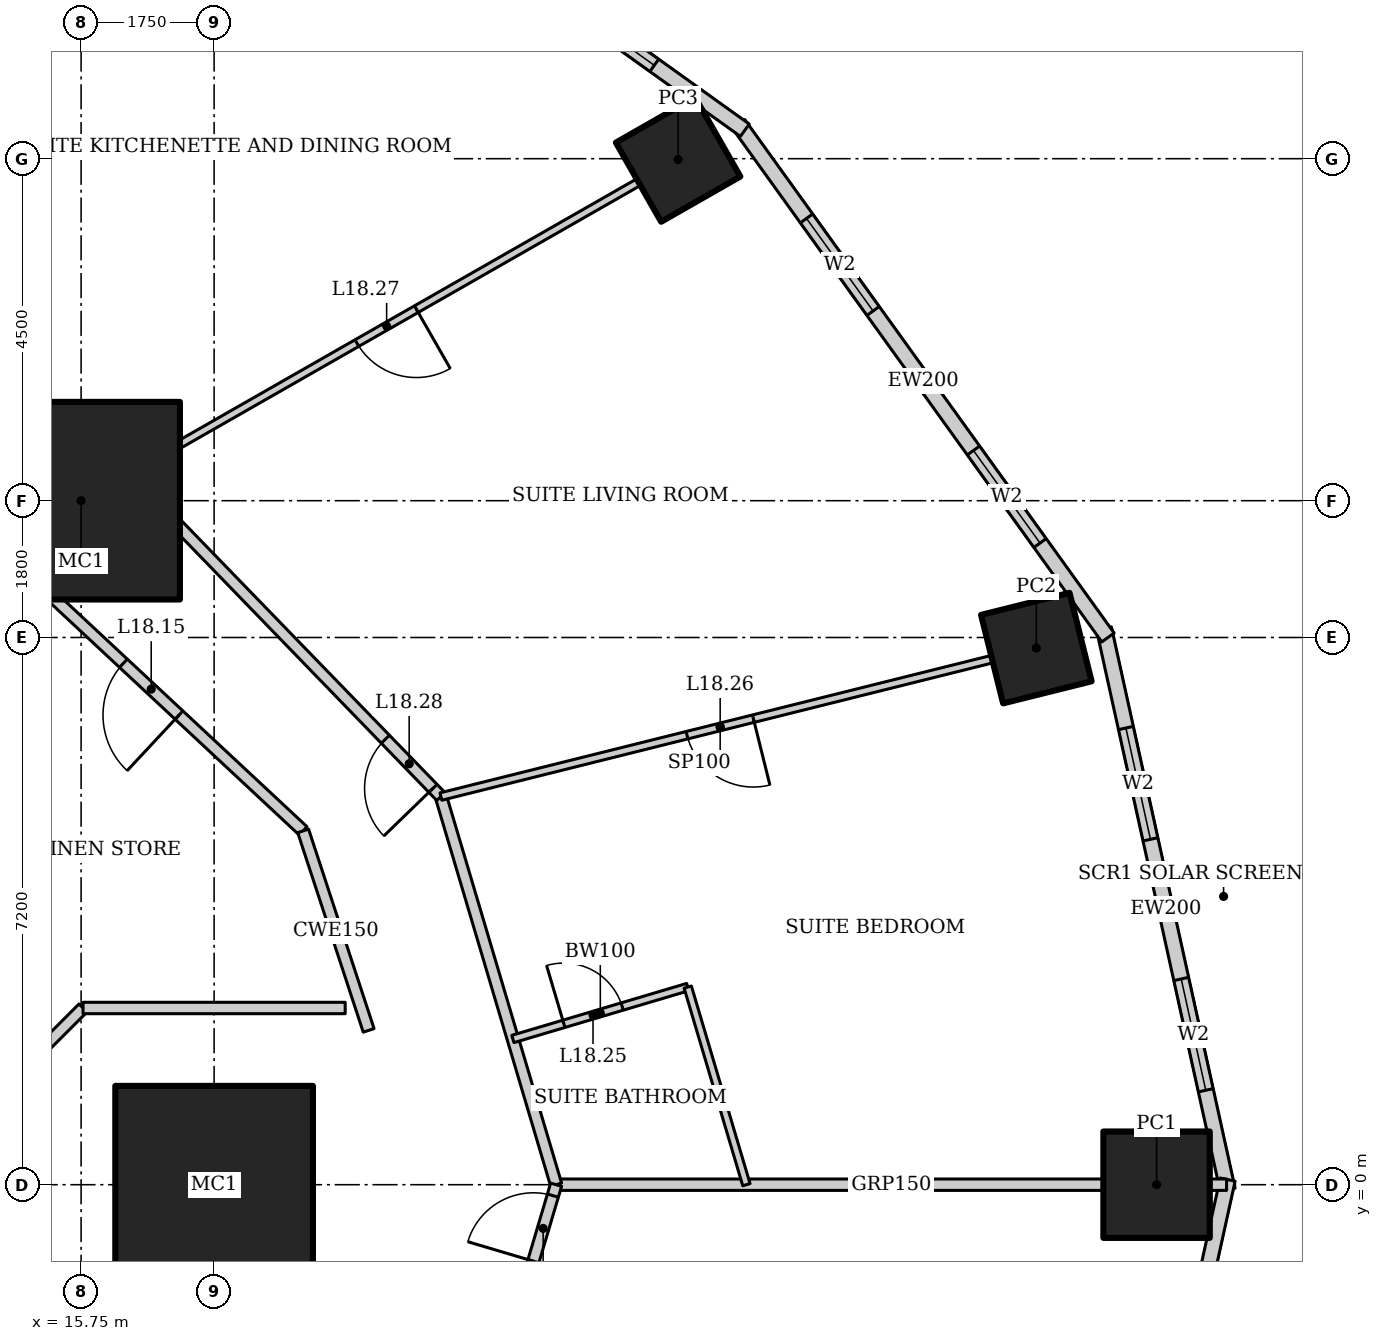
"""IFC4 building model, lengths in metres.
Left out: names, types, materials, properties, quantities, classifications, styles, units other than length and angle.
Written with IfcOpenShell. Run it as: python <this file> out.ifc"""

import sys

from ifc_helpers import new_model, si_unit, direction, frame, frame_2d, origin, origin_2d, place, context, subcontext, project, spatial, rectangle, hollow_rectangle, extrude, element, fill, save


model = new_model("IFC4")
c1 = context("Model", 3, precision=1e-05, world=origin(), true_north=direction((0.0, 1.0)))
c2 = subcontext(c1, "Body", "Model", "MODEL_VIEW")
j1 = project(units=[si_unit("LENGTHUNIT", "METRE"), si_unit("PLANEANGLEUNIT", "RADIAN")], contexts=[c1])
p1 = place(None, origin())
s1 = spatial("IfcSite", under=j1, at=p1, CompositionType="ELEMENT")
p2 = place(p1, origin())
s2 = spatial("IfcBuilding", under=s1, at=p2, CompositionType="ELEMENT")
p3 = place(p2, frame((0.0, 0.0, 80.2)))
s3 = spatial("IfcBuildingStorey", under=s2, at=p3, CompositionType="ELEMENT", Elevation=80.2)
for number, where, z_axis, x_axis in (
    (1, (17.5, 0.0, 0.0), (0.0, 0.0, 1.0), (1.0, 0.0, 0.0)),
    (2, (15.75, 9.0, 0.0), (0.0, 0.0, 1.0), (1.0, 0.0, 0.0)),
):
    element("IfcColumn", number, at=place(p3, frame(where, z_axis=z_axis, x_axis=x_axis)), inside=s3, PredefinedType="COLUMN", context=c2, shape_type="SweptSolid", body=[
        extrude(hollow_rectangle(XDim=2.6, YDim=2.6, WallThickness=0.13, at=origin_2d()), origin(), (0.0, 0.0, 1.0), 3.6),
    ])
p4 = place(p3, frame((29.9, 0.0, 0.0), z_axis=(0.0, 0.0, 1.0), x_axis=(1.0, 0.0, 0.0)))
e3 = element("IfcColumn", 3, at=p4, inside=s3, PredefinedType="COLUMN", context=c2, shape_type="SweptSolid", body=[
    extrude(hollow_rectangle(XDim=1.4, YDim=1.4, WallThickness=0.1, at=origin_2d()), origin(), (0.0, 0.0, 1.0), 3.6),
])
p5 = place(p3, frame((28.318, 7.06, 0.0), z_axis=(0.0, 0.0, 1.0), x_axis=(0.970295726276, 0.2419218956, 0.0)))
e4 = element("IfcColumn", 4, at=p5, inside=s3, PredefinedType="COLUMN", context=c2, shape_type="SweptSolid", body=[
    extrude(hollow_rectangle(XDim=1.2, YDim=1.2, WallThickness=0.1, at=origin_2d()), origin(), (0.0, 0.0, 1.0), 3.6),
])
p6 = place(p3, frame((23.605, 13.489, 0.0), z_axis=(0.0, 0.0, 1.0), x_axis=(0.86824298017, 0.496139221777, 0.0)))
e5 = element("IfcColumn", 5, at=p6, inside=s3, PredefinedType="COLUMN", context=c2, shape_type="SweptSolid", body=[
    extrude(hollow_rectangle(XDim=1.2, YDim=1.2, WallThickness=0.12, at=origin_2d()), origin(), (0.0, 0.0, 1.0), 3.6),
])
p7 = place(p3, frame((30.835, -0.067, 0.0), z_axis=(0.0, 0.0, 1.0), x_axis=(-0.215238065514, 0.976561608478, 0.0)))
e6 = element("IfcWall", 6, at=p7, inside=s3, PredefinedType="SOLIDWALL", context=c2, shape_type="SweptSolid", body=[
    extrude(rectangle(XDim=7.562, YDim=0.2, at=frame_2d((3.781, 0.0))), origin(), (0.0, 0.0, 1.0), 3.45),
])
p8 = place(p7, frame((1.341, 0.0, 0.5)))
e7 = element("IfcOpeningElement", 7, at=p8, cuts=e6, PredefinedType="OPENING", context=c2, shape_type="SweptSolid", body=[
    extrude(rectangle(XDim=1.5, YDim=2.2, at=frame_2d((0.75, 1.1))), frame((0.0, 0.11, 0.0), z_axis=(0.0, -1.0, 0.0), x_axis=(1.0, 0.0, 0.0)), (0.0, 0.0, 1.0), 0.22),
])
p9 = place(p7, frame((4.722, 0.0, 0.5)))
e8 = element("IfcOpeningElement", 8, at=p9, cuts=e6, PredefinedType="OPENING", context=c2, shape_type="SweptSolid", body=[
    extrude(rectangle(XDim=1.5, YDim=2.2, at=frame_2d((0.75, 1.1))), frame((0.0, 0.11, 0.0), z_axis=(0.0, -1.0, 0.0), x_axis=(1.0, 0.0, 0.0)), (0.0, 0.0, 1.0), 0.22),
])
p10 = place(p3, frame((29.26, 7.2, 0.0), z_axis=(0.0, 0.0, 1.0), x_axis=(-0.583937613703, 0.811798536155, 0.0)))
e9 = element("IfcWall", 9, at=p10, inside=s3, PredefinedType="SOLIDWALL", context=c2, shape_type="SweptSolid", body=[
    extrude(rectangle(XDim=8.323, YDim=0.2, at=frame_2d((4.162, 0.0))), origin(), (0.0, 0.0, 1.0), 3.45),
])
p11 = place(p10, frame((1.531, 0.0, 0.5)))
e10 = element("IfcOpeningElement", 10, at=p11, cuts=e9, PredefinedType="OPENING", context=c2, shape_type="SweptSolid", body=[
    extrude(rectangle(XDim=1.5, YDim=2.2, at=frame_2d((0.75, 1.1))), frame((0.0, 0.11, 0.0), z_axis=(0.0, -1.0, 0.0), x_axis=(1.0, 0.0, 0.0)), (0.0, 0.0, 1.0), 0.22),
])
p12 = place(p10, frame((5.292, 0.0, 0.5)))
e11 = element("IfcOpeningElement", 11, at=p12, cuts=e9, PredefinedType="OPENING", context=c2, shape_type="SweptSolid", body=[
    extrude(rectangle(XDim=1.5, YDim=2.2, at=frame_2d((0.75, 1.1))), frame((0.0, 0.11, 0.0), z_axis=(0.0, -1.0, 0.0), x_axis=(1.0, 0.0, 0.0)), (0.0, 0.0, 1.0), 0.22),
])
p13 = place(p3, frame((24.482, 13.875, 0.0), z_axis=(0.0, 0.0, 1.0), x_axis=(-0.812791321576, 0.582554948112, 0.0)))
e12 = element("IfcWall", 12, at=p13, inside=s3, PredefinedType="SOLIDWALL", context=c2, shape_type="SweptSolid", body=[
    extrude(rectangle(XDim=8.063, YDim=0.2, at=frame_2d((4.032, 0.0))), origin(), (0.0, 0.0, 1.0), 3.45),
])
p14 = place(p13, frame((1.466, 0.0, 0.5)))
e13 = element("IfcOpeningElement", 13, at=p14, cuts=e12, PredefinedType="OPENING", context=c2, shape_type="SweptSolid", body=[
    extrude(rectangle(XDim=1.5, YDim=2.2, at=frame_2d((0.75, 1.1))), frame((0.0, 0.11, 0.0), z_axis=(0.0, -1.0, 0.0), x_axis=(1.0, 0.0, 0.0)), (0.0, 0.0, 1.0), 0.22),
])
p15 = place(p13, frame((5.097, 0.0, 0.5)))
e14 = element("IfcOpeningElement", 14, at=p15, cuts=e12, PredefinedType="OPENING", context=c2, shape_type="SweptSolid", body=[
    extrude(rectangle(XDim=1.5, YDim=2.2, at=frame_2d((0.75, 1.1))), frame((0.0, 0.11, 0.0), z_axis=(0.0, -1.0, 0.0), x_axis=(1.0, 0.0, 0.0)), (0.0, 0.0, 1.0), 0.22),
])
p16 = place(p3, frame((29.208, -7.318, 0.0), z_axis=(0.0, 0.0, 1.0), x_axis=(0.215238065514, 0.976561608478, 0.0)))
e15 = element("IfcWall", 15, at=p16, inside=s3, PredefinedType="SOLIDWALL", context=c2, shape_type="SweptSolid", body=[
    extrude(rectangle(XDim=7.562, YDim=0.2, at=frame_2d((3.781, 0.0))), origin(), (0.0, 0.0, 1.0), 3.45),
])
p17 = place(p16, frame((1.341, 0.0, 0.5)))
e16 = element("IfcOpeningElement", 16, at=p17, cuts=e15, PredefinedType="OPENING", context=c2, shape_type="SweptSolid", body=[
    extrude(rectangle(XDim=1.5, YDim=2.2, at=frame_2d((0.75, 1.1))), frame((0.0, 0.11, 0.0), z_axis=(0.0, -1.0, 0.0), x_axis=(1.0, 0.0, 0.0)), (0.0, 0.0, 1.0), 0.22),
])
p18 = place(p16, frame((4.722, 0.0, 0.5)))
e17 = element("IfcOpeningElement", 17, at=p18, cuts=e15, PredefinedType="OPENING", context=c2, shape_type="SweptSolid", body=[
    extrude(rectangle(XDim=1.5, YDim=2.2, at=frame_2d((0.75, 1.1))), frame((0.0, 0.11, 0.0), z_axis=(0.0, -1.0, 0.0), x_axis=(1.0, 0.0, 0.0)), (0.0, 0.0, 1.0), 0.22),
])
p19 = place(p3, frame((30.821, 0.0, 0.0), z_axis=(0.0, 0.0, 1.0), x_axis=(-1.0, 0.0, 0.0)))
e18 = element("IfcWall", 18, at=p19, inside=s3, PredefinedType="PARTITIONING", context=c2, shape_type="SweptSolid", body=[
    extrude(rectangle(XDim=8.821, YDim=0.15, at=frame_2d((4.41, 0.0))), origin(), (0.0, 0.0, 1.0), 2.528),
])
p20 = place(p3, frame((17.97, 18.542, 0.0), z_axis=(0.0, 0.0, 1.0), x_axis=(-0.698279935955, -0.715824790743, 0.0)))
e19 = element("IfcWall", 19, at=p20, inside=s3, PredefinedType="PARTITIONING", context=c2, shape_type="SweptSolid", body=[
    extrude(rectangle(XDim=9.24, YDim=0.15, at=frame_2d((4.62, 0.0))), origin(), (0.0, 0.0, 1.0), 2.528),
])
p21 = place(p3, frame((22.0, 0.0, 0.0), z_axis=(0.0, 0.0, 1.0), x_axis=(-0.284584469409, 0.95865096869, 0.0)))
e20 = element("IfcWall", 20, at=p21, inside=s3, PredefinedType="PARTITIONING", context=c2, shape_type="SweptSolid", body=[
    extrude(rectangle(XDim=5.327, YDim=0.15, at=frame_2d((2.664, 0.0))), origin(), (0.0, 0.0, 1.0), 3.45),
])
p22 = place(p3, frame((20.484, 5.107, 0.0), z_axis=(0.0, 0.0, 1.0), x_axis=(-0.695871090686, 0.71816671125, 0.0)))
e21 = element("IfcWall", 21, at=p22, inside=s3, PredefinedType="PARTITIONING", context=c2, shape_type="SweptSolid", body=[
    extrude(rectangle(XDim=5.913, YDim=0.15, at=frame_2d((2.957, 0.0))), origin(), (0.0, 0.0, 1.0), 3.45),
])
p23 = place(p22, frame((0.15, 0.0, 0.0)))
e22 = element("IfcOpeningElement", 22, at=p23, cuts=e21, PredefinedType="OPENING", context=c2, shape_type="SweptSolid", body=[
    extrude(rectangle(XDim=0.9, YDim=2.1, at=frame_2d((0.45, 1.05))), frame((0.0, 0.085, 0.0), z_axis=(0.0, -1.0, 0.0), x_axis=(1.0, 0.0, 0.0)), (0.0, 0.0, 1.0), 0.17),
])
p24 = place(p3, frame((16.369, 9.354, 0.0), z_axis=(0.0, 0.0, 1.0), x_axis=(-0.883334368785, 0.468743419071, 0.0)))
e23 = element("IfcWall", 23, at=p24, inside=s3, PredefinedType="PARTITIONING", context=c2, shape_type="SweptSolid", body=[
    extrude(rectangle(XDim=5.491, YDim=0.15, at=frame_2d((2.746, 0.0))), origin(), (0.0, 0.0, 1.0), 3.45),
])
p25 = place(p3, frame((20.484, -5.107, 0.0), z_axis=(0.0, 0.0, 1.0), x_axis=(0.284584469409, 0.95865096869, 0.0)))
e24 = element("IfcWall", 24, at=p25, inside=s3, PredefinedType="PARTITIONING", context=c2, shape_type="SweptSolid", body=[
    extrude(rectangle(XDim=5.327, YDim=0.15, at=frame_2d((2.664, 0.0))), origin(), (0.0, 0.0, 1.0), 3.45),
])
p26 = place(p25, frame((4.278, 0.0, 0.0)))
e25 = element("IfcOpeningElement", 25, at=p26, cuts=e24, PredefinedType="OPENING", context=c2, shape_type="SweptSolid", body=[
    extrude(rectangle(XDim=0.9, YDim=2.1, at=frame_2d((0.45, 1.05))), frame((0.0, 0.085, 0.0), z_axis=(0.0, -1.0, 0.0), x_axis=(1.0, 0.0, 0.0)), (0.0, 0.0, 1.0), 0.17),
])
p27 = place(p3, frame((18.672, 4.655, 0.0), z_axis=(0.0, 0.0, 1.0), x_axis=(-0.731260145007, 0.682098673452, 0.0)))
e26 = element("IfcWall", 26, at=p27, inside=s3, PredefinedType="PARTITIONING", context=c2, shape_type="SweptSolid", body=[
    extrude(rectangle(XDim=5.468, YDim=0.15, at=frame_2d((2.734, 0.0))), origin(), (0.0, 0.0, 1.0), 3.45),
])
p28 = place(p27, frame((2.234, 0.0, 0.0)))
e27 = element("IfcOpeningElement", 27, at=p28, cuts=e26, PredefinedType="OPENING", context=c2, shape_type="SweptSolid", body=[
    extrude(rectangle(XDim=1.0, YDim=2.1, at=frame_2d((0.5, 1.05))), frame((0.0, 0.085, 0.0), z_axis=(0.0, -1.0, 0.0), x_axis=(1.0, 0.0, 0.0)), (0.0, 0.0, 1.0), 0.17),
])
p29 = place(p3, frame((21.431, 1.917, 0.0), z_axis=(0.0, 0.0, 1.0), x_axis=(0.958639927723, 0.284621659356, 0.0)))
e28 = element("IfcWall", 28, at=p29, inside=s3, PredefinedType="PARTITIONING", context=c2, shape_type="SweptSolid", body=[
    extrude(rectangle(XDim=2.4, YDim=0.1, at=frame_2d((1.2, 0.0))), origin(), (0.0, 0.0, 1.0), 3.45),
])
p30 = place(p29, frame((0.7, 0.0, 0.0)))
e29 = element("IfcOpeningElement", 29, at=p30, cuts=e28, PredefinedType="OPENING", context=c2, shape_type="SweptSolid", body=[
    extrude(rectangle(XDim=0.8, YDim=2.1, at=frame_2d((0.4, 1.05))), frame((0.0, 0.06, 0.0), z_axis=(0.0, -1.0, 0.0), x_axis=(1.0, 0.0, 0.0)), (0.0, 0.0, 1.0), 0.12),
])
p31 = place(p3, frame((23.732, 2.6, 0.0), z_axis=(0.0, 0.0, 1.0), x_axis=(0.284514277473, -0.958671803025, 0.0)))
e30 = element("IfcWall", 30, at=p31, inside=s3, PredefinedType="PARTITIONING", context=c2, shape_type="SweptSolid", body=[
    extrude(rectangle(XDim=2.712, YDim=0.1, at=frame_2d((1.356, 0.0))), origin(), (0.0, 0.0, 1.0), 3.45),
])
p32 = place(p3, frame((27.833, 6.939, 0.0), z_axis=(0.0, 0.0, 1.0), x_axis=(-0.970295894358, -0.24192122146, 0.0)))
e31 = element("IfcWall", 31, at=p32, inside=s3, PredefinedType="PARTITIONING", context=c2, shape_type="SweptSolid", body=[
    extrude(rectangle(XDim=7.574, YDim=0.1, at=frame_2d((3.787, 0.0))), origin(), (0.0, 0.0, 1.0), 2.333),
])
p33 = place(p32, frame((3.337, 0.0, 0.0)))
e32 = element("IfcOpeningElement", 32, at=p33, cuts=e31, PredefinedType="OPENING", context=c2, shape_type="SweptSolid", body=[
    extrude(rectangle(XDim=0.9, YDim=2.1, at=frame_2d((0.45, 1.05))), frame((0.0, 0.06, 0.0), z_axis=(0.0, -1.0, 0.0), x_axis=(1.0, 0.0, 0.0)), (0.0, 0.0, 1.0), 0.12),
])
p34 = place(p3, frame((23.171, 13.24, 0.0), z_axis=(0.0, 0.0, 1.0), x_axis=(-0.868243142124, -0.496138938357, 0.0)))
e33 = element("IfcWall", 33, at=p34, inside=s3, PredefinedType="PARTITIONING", context=c2, shape_type="SweptSolid", body=[
    extrude(rectangle(XDim=7.834, YDim=0.1, at=frame_2d((3.917, 0.0))), origin(), (0.0, 0.0, 1.0), 2.693),
])
p35 = place(p34, frame((3.467, 0.0, 0.0)))
e34 = element("IfcOpeningElement", 34, at=p35, cuts=e33, PredefinedType="OPENING", context=c2, shape_type="SweptSolid", body=[
    extrude(rectangle(XDim=0.9, YDim=2.1, at=frame_2d((0.45, 1.05))), frame((0.0, 0.06, 0.0), z_axis=(0.0, -1.0, 0.0), x_axis=(1.0, 0.0, 0.0)), (0.0, 0.0, 1.0), 0.12),
])
p36 = place(p3, frame((19.533, 2.03, 0.0), z_axis=(0.0, 0.0, 1.0), x_axis=(-0.311929965981, 0.950105097515, 0.0)))
e35 = element("IfcWall", 35, at=p36, inside=s3, PredefinedType="PARTITIONING", context=c2, shape_type="SweptSolid", body=[
    extrude(rectangle(XDim=2.763, YDim=0.15, at=frame_2d((1.381, 0.0))), origin(), (0.0, 0.0, 1.0), 3.45),
])
p37 = place(p3, frame((15.175, 1.725, 0.0), z_axis=(0.0, 0.0, 1.0), x_axis=(0.707106781187, 0.707106781187, 0.0)))
e36 = element("IfcWall", 36, at=p37, inside=s3, PredefinedType="PARTITIONING", context=c2, shape_type="SweptSolid", body=[
    extrude(rectangle(XDim=0.849, YDim=0.15, at=frame_2d((0.425, 0.0))), origin(), (0.0, 0.0, 1.0), 3.45),
])
p38 = place(p3, frame((15.775, 2.325, 0.0), z_axis=(0.0, 0.0, 1.0), x_axis=(1.0, 0.0, 0.0)))
e37 = element("IfcWall", 37, at=p38, inside=s3, PredefinedType="PARTITIONING", context=c2, shape_type="SweptSolid", body=[
    extrude(rectangle(XDim=3.449, YDim=0.15, at=frame_2d((1.725, 0.0))), origin(), (0.0, 0.0, 1.0), 3.45),
])
p39 = place(p8, origin())
e38 = element("IfcWindow", 38, at=p39, inside=s3, PartitioningType="SINGLE_PANEL", PredefinedType="WINDOW", context=c2, shape_type="SweptSolid", body=[
    extrude(rectangle(XDim=1.5, YDim=2.2, at=frame_2d((0.75, 1.1))), frame((0.0, 0.03, 0.0), z_axis=(0.0, -1.0, 0.0), x_axis=(1.0, 0.0, 0.0)), (0.0, 0.0, 1.0), 0.06),
])
fill(e7, e38)
p40 = place(p9, origin())
e39 = element("IfcWindow", 39, at=p40, inside=s3, PartitioningType="SINGLE_PANEL", PredefinedType="WINDOW", context=c2, shape_type="SweptSolid", body=[
    extrude(rectangle(XDim=1.5, YDim=2.2, at=frame_2d((0.75, 1.1))), frame((0.0, 0.03, 0.0), z_axis=(0.0, -1.0, 0.0), x_axis=(1.0, 0.0, 0.0)), (0.0, 0.0, 1.0), 0.06),
])
fill(e8, e39)
p41 = place(p11, origin())
e40 = element("IfcWindow", 40, at=p41, inside=s3, PartitioningType="SINGLE_PANEL", PredefinedType="WINDOW", context=c2, shape_type="SweptSolid", body=[
    extrude(rectangle(XDim=1.5, YDim=2.2, at=frame_2d((0.75, 1.1))), frame((0.0, 0.03, 0.0), z_axis=(0.0, -1.0, 0.0), x_axis=(1.0, 0.0, 0.0)), (0.0, 0.0, 1.0), 0.06),
])
fill(e10, e40)
p42 = place(p12, origin())
e41 = element("IfcWindow", 41, at=p42, inside=s3, PartitioningType="SINGLE_PANEL", PredefinedType="WINDOW", context=c2, shape_type="SweptSolid", body=[
    extrude(rectangle(XDim=1.5, YDim=2.2, at=frame_2d((0.75, 1.1))), frame((0.0, 0.03, 0.0), z_axis=(0.0, -1.0, 0.0), x_axis=(1.0, 0.0, 0.0)), (0.0, 0.0, 1.0), 0.06),
])
fill(e11, e41)
p43 = place(p14, origin())
e42 = element("IfcWindow", 42, at=p43, inside=s3, PartitioningType="SINGLE_PANEL", PredefinedType="WINDOW", context=c2, shape_type="SweptSolid", body=[
    extrude(rectangle(XDim=1.5, YDim=2.2, at=frame_2d((0.75, 1.1))), frame((0.0, 0.03, 0.0), z_axis=(0.0, -1.0, 0.0), x_axis=(1.0, 0.0, 0.0)), (0.0, 0.0, 1.0), 0.06),
])
fill(e13, e42)
p44 = place(p28, origin())
e43 = element("IfcDoor", 43, at=p44, inside=s3, OperationType="SINGLE_SWING_LEFT", PredefinedType="DOOR", context=c2, shape_type="SweptSolid", body=[
    extrude(rectangle(XDim=1.0, YDim=2.1, at=frame_2d((0.5, 1.05))), frame((0.0, 0.025, 0.0), z_axis=(0.0, -1.0, 0.0), x_axis=(1.0, 0.0, 0.0)), (0.0, 0.0, 1.0), 0.05),
])
fill(e27, e43)
p45 = place(p30, origin())
e44 = element("IfcDoor", 44, at=p45, inside=s3, OperationType="SINGLE_SWING_LEFT", PredefinedType="DOOR", context=c2, shape_type="SweptSolid", body=[
    extrude(rectangle(XDim=0.8, YDim=2.1, at=frame_2d((0.4, 1.05))), frame((0.0, 0.025, 0.0), z_axis=(0.0, -1.0, 0.0), x_axis=(1.0, 0.0, 0.0)), (0.0, 0.0, 1.0), 0.05),
])
fill(e29, e44)
p46 = place(p33, origin())
e45 = element("IfcDoor", 45, at=p46, inside=s3, OperationType="SINGLE_SWING_LEFT", PredefinedType="DOOR", context=c2, shape_type="SweptSolid", body=[
    extrude(rectangle(XDim=0.9, YDim=2.1, at=frame_2d((0.45, 1.05))), frame((0.0, 0.025, 0.0), z_axis=(0.0, -1.0, 0.0), x_axis=(1.0, 0.0, 0.0)), (0.0, 0.0, 1.0), 0.05),
])
fill(e32, e45)
p47 = place(p35, origin())
e46 = element("IfcDoor", 46, at=p47, inside=s3, OperationType="SINGLE_SWING_LEFT", PredefinedType="DOOR", context=c2, shape_type="SweptSolid", body=[
    extrude(rectangle(XDim=0.9, YDim=2.1, at=frame_2d((0.45, 1.05))), frame((0.0, 0.025, 0.0), z_axis=(0.0, -1.0, 0.0), x_axis=(1.0, 0.0, 0.0)), (0.0, 0.0, 1.0), 0.05),
])
fill(e34, e46)
p48 = place(p23, origin())
e47 = element("IfcDoor", 47, at=p48, inside=s3, OperationType="SINGLE_SWING_LEFT", PredefinedType="DOOR", context=c2, shape_type="SweptSolid", body=[
    extrude(rectangle(XDim=0.9, YDim=2.1, at=frame_2d((0.45, 1.05))), frame((0.0, 0.025, 0.0), z_axis=(0.0, -1.0, 0.0), x_axis=(1.0, 0.0, 0.0)), (0.0, 0.0, 1.0), 0.05),
])
fill(e22, e47)
p49 = place(p26, origin())
e48 = element("IfcDoor", 48, at=p49, inside=s3, OperationType="SINGLE_SWING_LEFT", PredefinedType="DOOR", context=c2, shape_type="SweptSolid", body=[
    extrude(rectangle(XDim=0.9, YDim=2.1, at=frame_2d((0.45, 1.05))), frame((0.0, 0.025, 0.0), z_axis=(0.0, -1.0, 0.0), x_axis=(1.0, 0.0, 0.0)), (0.0, 0.0, 1.0), 0.05),
])
fill(e25, e48)
save(model, sys.argv[1])
